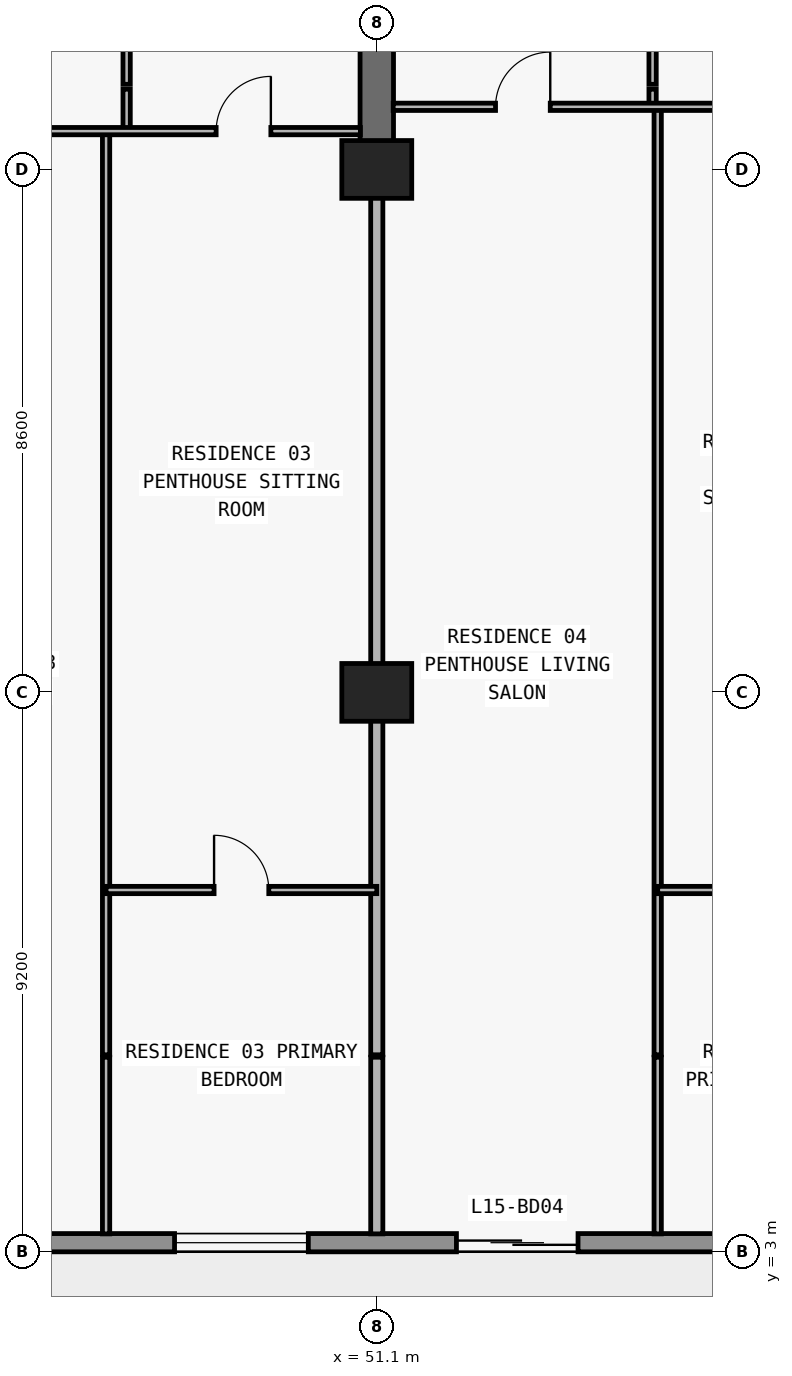
"""IFC4 building model, lengths in metres.
Left out: names, types, materials, properties, quantities, classifications, styles, units other than length and angle.
Written with IfcOpenShell. Run it as: python <this file> out.ifc"""

import sys

from ifc_helpers import new_model, si_unit, direction, frame, frame_2d, origin, origin_2d, place, context, subcontext, project, spatial, rectangle, extrude, element, fill, save


model = new_model("IFC4")
c1 = context("Model", 3, precision=1e-05, world=origin(), true_north=direction((0.0, 1.0)))
c2 = subcontext(c1, "Body", "Model", "MODEL_VIEW")
j1 = project(units=[si_unit("LENGTHUNIT", "METRE"), si_unit("PLANEANGLEUNIT", "RADIAN")], contexts=[c1])
p1 = place(None, origin())
s1 = spatial("IfcSite", under=j1, at=p1, CompositionType="ELEMENT")
p2 = place(p1, origin())
s2 = spatial("IfcBuilding", under=s1, at=p2, CompositionType="ELEMENT")
p3 = place(p2, frame((0.0, 0.0, 59.7)))
s3 = spatial("IfcBuildingStorey", under=s2, at=p3, CompositionType="ELEMENT", Elevation=59.7)
for number, where, z_axis, x_axis in (
    (1, (51.1, 12.2, 0.0), (0.0, 0.0, 1.0), (1.0, 0.0, 0.0)),
    (2, (51.1, 20.8, 0.0), (0.0, 0.0, 1.0), (1.0, 0.0, 0.0)),
):
    element("IfcColumn", number, at=place(p3, frame(where, z_axis=z_axis, x_axis=x_axis)), inside=s3, PredefinedType="COLUMN", context=c2, shape_type="SweptSolid", body=[
        extrude(rectangle(XDim=1.15, YDim=0.95, at=origin_2d()), origin(), (0.0, 0.0, 1.0), 3.05),
    ])
p4 = place(p3, frame((51.1, 20.8, 0.0), z_axis=(0.0, 0.0, 1.0), x_axis=(0.0, 1.0, 0.0)))
e3 = element("IfcWall", 3, at=p4, inside=s3, PredefinedType="SHEAR", context=c2, shape_type="SweptSolid", body=[
    extrude(rectangle(XDim=8.6, YDim=0.55, at=frame_2d((4.3, 0.0))), origin(), (0.0, 0.0, 1.0), 3.05),
])
p5 = place(p3, frame((72.7, 3.15, 0.0), z_axis=(0.0, 0.0, 1.0), x_axis=(-1.0, 0.0, 0.0)))
e4 = element("IfcWall", 4, at=p5, inside=s3, PredefinedType="STANDARD", context=c2, shape_type="SweptSolid", body=[
    extrude(rectangle(XDim=67.6, YDim=0.3, at=frame_2d((33.8, 0.0))), origin(), (0.0, 0.0, 1.0), 3.05),
])
p6 = place(p5, frame((59.89, 0.0, 0.0)))
e5 = element("IfcOpeningElement", 5, at=p6, cuts=e4, PredefinedType="OPENING", context=c2, shape_type="SweptSolid", body=[
    extrude(rectangle(XDim=2.0, YDim=2.3, at=frame_2d((1.0, 1.15))), frame((0.0, 0.16, 0.0), z_axis=(0.0, -1.0, 0.0), x_axis=(1.0, 0.0, 0.0)), (0.0, 0.0, 1.0), 0.32),
])
p7 = place(p5, frame((55.21, 0.0, 0.65)))
e6 = element("IfcOpeningElement", 6, at=p7, cuts=e4, PredefinedType="OPENING", context=c2, shape_type="SweptSolid", body=[
    extrude(rectangle(XDim=2.6, YDim=1.85, at=frame_2d((1.3, 0.925))), frame((0.0, 0.16, 0.0), z_axis=(0.0, -1.0, 0.0), x_axis=(1.0, 0.0, 0.0)), (0.0, 0.0, 1.0), 0.32),
])
p8 = place(p5, frame((49.1, 0.0, 0.85)))
e7 = element("IfcOpeningElement", 7, at=p8, cuts=e4, PredefinedType="OPENING", context=c2, shape_type="SweptSolid", body=[
    extrude(rectangle(XDim=2.2, YDim=1.55, at=frame_2d((1.1, 0.775))), frame((0.0, 0.16, 0.0), z_axis=(0.0, -1.0, 0.0), x_axis=(1.0, 0.0, 0.0)), (0.0, 0.0, 1.0), 0.32),
])
p9 = place(p5, frame((43.09, 0.0, 0.0)))
e8 = element("IfcOpeningElement", 8, at=p9, cuts=e4, PredefinedType="OPENING", context=c2, shape_type="SweptSolid", body=[
    extrude(rectangle(XDim=2.0, YDim=2.3, at=frame_2d((1.0, 1.15))), frame((0.0, 0.16, 0.0), z_axis=(0.0, -1.0, 0.0), x_axis=(1.0, 0.0, 0.0)), (0.0, 0.0, 1.0), 0.32),
])
p10 = place(p5, frame((38.41, 0.0, 0.65)))
e9 = element("IfcOpeningElement", 9, at=p10, cuts=e4, PredefinedType="OPENING", context=c2, shape_type="SweptSolid", body=[
    extrude(rectangle(XDim=2.6, YDim=1.85, at=frame_2d((1.3, 0.925))), frame((0.0, 0.16, 0.0), z_axis=(0.0, -1.0, 0.0), x_axis=(1.0, 0.0, 0.0)), (0.0, 0.0, 1.0), 0.32),
])
p11 = place(p5, frame((32.7, 0.0, 0.85)))
e10 = element("IfcOpeningElement", 10, at=p11, cuts=e4, PredefinedType="OPENING", context=c2, shape_type="SweptSolid", body=[
    extrude(rectangle(XDim=2.2, YDim=1.55, at=frame_2d((1.1, 0.775))), frame((0.0, 0.16, 0.0), z_axis=(0.0, -1.0, 0.0), x_axis=(1.0, 0.0, 0.0)), (0.0, 0.0, 1.0), 0.32),
])
p12 = place(p5, frame((27.026, 0.0, 0.0)))
e11 = element("IfcOpeningElement", 11, at=p12, cuts=e4, PredefinedType="OPENING", context=c2, shape_type="SweptSolid", body=[
    extrude(rectangle(XDim=2.0, YDim=2.3, at=frame_2d((1.0, 1.15))), frame((0.0, 0.16, 0.0), z_axis=(0.0, -1.0, 0.0), x_axis=(1.0, 0.0, 0.0)), (0.0, 0.0, 1.0), 0.32),
])
p13 = place(p5, frame((22.726, 0.0, 0.85)))
e12 = element("IfcOpeningElement", 12, at=p13, cuts=e4, PredefinedType="OPENING", context=c2, shape_type="SweptSolid", body=[
    extrude(rectangle(XDim=2.2, YDim=1.55, at=frame_2d((1.1, 0.775))), frame((0.0, 0.16, 0.0), z_axis=(0.0, -1.0, 0.0), x_axis=(1.0, 0.0, 0.0)), (0.0, 0.0, 1.0), 0.32),
])
p14 = place(p5, frame((18.29, 0.0, 0.0)))
e13 = element("IfcOpeningElement", 13, at=p14, cuts=e4, PredefinedType="OPENING", context=c2, shape_type="SweptSolid", body=[
    extrude(rectangle(XDim=2.0, YDim=2.3, at=frame_2d((1.0, 1.15))), frame((0.0, 0.16, 0.0), z_axis=(0.0, -1.0, 0.0), x_axis=(1.0, 0.0, 0.0)), (0.0, 0.0, 1.0), 0.32),
])
p15 = place(p5, frame((14.19, 0.0, 0.85)))
e14 = element("IfcOpeningElement", 14, at=p15, cuts=e4, PredefinedType="OPENING", context=c2, shape_type="SweptSolid", body=[
    extrude(rectangle(XDim=1.8, YDim=1.55, at=frame_2d((0.9, 0.775))), frame((0.0, 0.16, 0.0), z_axis=(0.0, -1.0, 0.0), x_axis=(1.0, 0.0, 0.0)), (0.0, 0.0, 1.0), 0.32),
])
p16 = place(p5, frame((10.226, 0.0, 0.0)))
e15 = element("IfcOpeningElement", 15, at=p16, cuts=e4, PredefinedType="OPENING", context=c2, shape_type="SweptSolid", body=[
    extrude(rectangle(XDim=2.0, YDim=2.3, at=frame_2d((1.0, 1.15))), frame((0.0, 0.16, 0.0), z_axis=(0.0, -1.0, 0.0), x_axis=(1.0, 0.0, 0.0)), (0.0, 0.0, 1.0), 0.32),
])
p17 = place(p5, frame((5.926, 0.0, 0.85)))
e16 = element("IfcOpeningElement", 16, at=p17, cuts=e4, PredefinedType="OPENING", context=c2, shape_type="SweptSolid", body=[
    extrude(rectangle(XDim=2.2, YDim=1.55, at=frame_2d((1.1, 0.775))), frame((0.0, 0.16, 0.0), z_axis=(0.0, -1.0, 0.0), x_axis=(1.0, 0.0, 0.0)), (0.0, 0.0, 1.0), 0.32),
])
p18 = place(p3, frame((46.648, 3.295, 0.0), z_axis=(0.0, 0.0, 1.0), x_axis=(0.0, 1.0, 0.0)))
e17 = element("IfcWall", 17, at=p18, inside=s3, PredefinedType="PARTITIONING", context=c2, shape_type="SweptSolid", body=[
    extrude(rectangle(XDim=2.905, YDim=0.12, at=frame_2d((1.453, 0.0))), origin(), (0.0, 0.0, 1.0), 3.05),
])
p19 = place(p3, frame((46.648, 6.24, 0.0), z_axis=(0.0, 0.0, 1.0), x_axis=(0.0, 1.0, 0.0)))
e18 = element("IfcWall", 18, at=p19, inside=s3, PredefinedType="PARTITIONING", context=c2, shape_type="SweptSolid", body=[
    extrude(rectangle(XDim=15.19, YDim=0.12, at=frame_2d((7.595, 0.0))), origin(), (0.0, 0.0, 1.0), 3.05),
])
p20 = place(p3, frame((46.986, 21.43, 0.0), z_axis=(0.0, 0.0, 1.0), x_axis=(0.0, 1.0, 0.0)))
e19 = element("IfcWall", 19, at=p20, inside=s3, PredefinedType="PARTITIONING", context=c2, shape_type="SweptSolid", body=[
    extrude(rectangle(XDim=0.69, YDim=0.12, at=frame_2d((0.345, 0.0))), origin(), (0.0, 0.0, 1.0), 3.05),
])
p21 = place(p3, frame((46.986, 22.2, 0.0), z_axis=(0.0, 0.0, 1.0), x_axis=(0.0, 1.0, 0.0)))
e20 = element("IfcWall", 20, at=p21, inside=s3, PredefinedType="PARTITIONING", context=c2, shape_type="SweptSolid", body=[
    extrude(rectangle(XDim=4.38, YDim=0.12, at=frame_2d((2.19, 0.0))), origin(), (0.0, 0.0, 1.0), 3.05),
])
p22 = place(p21, frame((1.74, 0.0, 0.0)))
e21 = element("IfcOpeningElement", 21, at=p22, cuts=e20, PredefinedType="OPENING", context=c2, shape_type="SweptSolid", body=[
    extrude(rectangle(XDim=0.9, YDim=2.15, at=frame_2d((0.45, 1.075))), frame((0.0, 0.07, 0.0), z_axis=(0.0, -1.0, 0.0), x_axis=(1.0, 0.0, 0.0)), (0.0, 0.0, 1.0), 0.14),
])
p23 = place(p3, frame((51.1, 3.295, 0.0), z_axis=(0.0, 0.0, 1.0), x_axis=(0.0, 1.0, 0.0)))
e22 = element("IfcWall", 22, at=p23, inside=s3, PredefinedType="PARTITIONING", context=c2, shape_type="SweptSolid", body=[
    extrude(rectangle(XDim=2.905, YDim=0.2, at=frame_2d((1.453, 0.0))), origin(), (0.0, 0.0, 1.0), 3.05),
])
p24 = place(p3, frame((51.1, 6.24, 0.0), z_axis=(0.0, 0.0, 1.0), x_axis=(0.0, 1.0, 0.0)))
e23 = element("IfcWall", 23, at=p24, inside=s3, PredefinedType="PARTITIONING", context=c2, shape_type="SweptSolid", body=[
    extrude(rectangle(XDim=14.555, YDim=0.2, at=frame_2d((7.277, 0.0))), origin(), (0.0, 0.0, 1.0), 2.11),
])
p25 = place(p3, frame((55.636, 21.83, 0.0), z_axis=(0.0, 0.0, 1.0), x_axis=(0.0, 1.0, 0.0)))
e24 = element("IfcWall", 24, at=p25, inside=s3, PredefinedType="PARTITIONING", context=c2, shape_type="SweptSolid", body=[
    extrude(rectangle(XDim=0.29, YDim=0.12, at=frame_2d((0.145, 0.0))), origin(), (0.0, 0.0, 1.0), 3.05),
])
p26 = place(p3, frame((55.636, 22.2, 0.0), z_axis=(0.0, 0.0, 1.0), x_axis=(0.0, 1.0, 0.0)))
e25 = element("IfcWall", 25, at=p26, inside=s3, PredefinedType="PARTITIONING", context=c2, shape_type="SweptSolid", body=[
    extrude(rectangle(XDim=4.38, YDim=0.12, at=frame_2d((2.19, 0.0))), origin(), (0.0, 0.0, 1.0), 3.05),
])
p27 = place(p26, frame((1.74, 0.0, 0.0)))
e26 = element("IfcOpeningElement", 26, at=p27, cuts=e25, PredefinedType="OPENING", context=c2, shape_type="SweptSolid", body=[
    extrude(rectangle(XDim=0.9, YDim=2.15, at=frame_2d((0.45, 1.075))), frame((0.0, 0.07, 0.0), z_axis=(0.0, -1.0, 0.0), x_axis=(1.0, 0.0, 0.0)), (0.0, 0.0, 1.0), 0.14),
])
p28 = place(p3, frame((55.72, 3.295, 0.0), z_axis=(0.0, 0.0, 1.0), x_axis=(0.0, 1.0, 0.0)))
e27 = element("IfcWall", 27, at=p28, inside=s3, PredefinedType="PARTITIONING", context=c2, shape_type="SweptSolid", body=[
    extrude(rectangle(XDim=2.905, YDim=0.12, at=frame_2d((1.453, 0.0))), origin(), (0.0, 0.0, 1.0), 3.05),
])
p29 = place(p3, frame((55.72, 6.24, 0.0), z_axis=(0.0, 0.0, 1.0), x_axis=(0.0, 1.0, 0.0)))
e28 = element("IfcWall", 28, at=p29, inside=s3, PredefinedType="PARTITIONING", context=c2, shape_type="SweptSolid", body=[
    extrude(rectangle(XDim=15.585, YDim=0.12, at=frame_2d((7.792, 0.0))), origin(), (0.0, 0.0, 1.0), 3.05),
])
p30 = place(p3, frame((46.648, 8.95, 0.0), z_axis=(0.0, 0.0, 1.0), x_axis=(1.0, 0.0, 0.0)))
e29 = element("IfcWall", 29, at=p30, inside=s3, PredefinedType="PARTITIONING", context=c2, shape_type="SweptSolid", body=[
    extrude(rectangle(XDim=4.452, YDim=0.12, at=frame_2d((2.226, 0.0))), origin(), (0.0, 0.0, 1.0), 3.05),
])
p31 = place(p30, frame((1.776, 0.0, 0.0)))
e30 = element("IfcOpeningElement", 30, at=p31, cuts=e29, PredefinedType="OPENING", context=c2, shape_type="SweptSolid", body=[
    extrude(rectangle(XDim=0.9, YDim=2.15, at=frame_2d((0.45, 1.075))), frame((0.0, 0.07, 0.0), z_axis=(0.0, -1.0, 0.0), x_axis=(1.0, 0.0, 0.0)), (0.0, 0.0, 1.0), 0.14),
])
p32 = place(p3, frame((55.72, 8.95, 0.0), z_axis=(0.0, 0.0, 1.0), x_axis=(1.0, 0.0, 0.0)))
e31 = element("IfcWall", 31, at=p32, inside=s3, PredefinedType="PARTITIONING", context=c2, shape_type="SweptSolid", body=[
    extrude(rectangle(XDim=3.78, YDim=0.12, at=frame_2d((1.89, 0.0))), origin(), (0.0, 0.0, 1.0), 3.05),
])
p33 = place(p32, frame((1.44, 0.0, 0.0)))
e32 = element("IfcOpeningElement", 32, at=p33, cuts=e31, PredefinedType="OPENING", context=c2, shape_type="SweptSolid", body=[
    extrude(rectangle(XDim=0.9, YDim=2.15, at=frame_2d((0.45, 1.075))), frame((0.0, 0.07, 0.0), z_axis=(0.0, -1.0, 0.0), x_axis=(1.0, 0.0, 0.0)), (0.0, 0.0, 1.0), 0.14),
])
p34 = place(p3, frame((42.7, 21.43, 0.0), z_axis=(0.0, 0.0, 1.0), x_axis=(1.0, 0.0, 0.0)))
e33 = element("IfcWall", 33, at=p34, inside=s3, PredefinedType="PARTITIONING", context=c2, shape_type="SweptSolid", body=[
    extrude(rectangle(XDim=8.13, YDim=0.12, at=frame_2d((4.065, 0.0))), origin(), (0.0, 0.0, 1.0), 3.05),
])
p35 = place(p34, frame((1.524, 0.0, 0.0)))
e34 = element("IfcOpeningElement", 34, at=p35, cuts=e33, PredefinedType="OPENING", context=c2, shape_type="SweptSolid", body=[
    extrude(rectangle(XDim=0.9, YDim=2.15, at=frame_2d((0.45, 1.075))), frame((0.0, 0.07, 0.0), z_axis=(0.0, -1.0, 0.0), x_axis=(1.0, 0.0, 0.0)), (0.0, 0.0, 1.0), 0.14),
])
p36 = place(p34, frame((5.758, 0.0, 0.0)))
e35 = element("IfcOpeningElement", 35, at=p36, cuts=e33, PredefinedType="OPENING", context=c2, shape_type="SweptSolid", body=[
    extrude(rectangle(XDim=0.9, YDim=2.15, at=frame_2d((0.45, 1.075))), frame((0.0, 0.07, 0.0), z_axis=(0.0, -1.0, 0.0), x_axis=(1.0, 0.0, 0.0)), (0.0, 0.0, 1.0), 0.14),
])
p37 = place(p3, frame((51.37, 21.83, 0.0), z_axis=(0.0, 0.0, 1.0), x_axis=(1.0, 0.0, 0.0)))
e36 = element("IfcWall", 36, at=p37, inside=s3, PredefinedType="PARTITIONING", context=c2, shape_type="SweptSolid", body=[
    extrude(rectangle(XDim=8.13, YDim=0.12, at=frame_2d((4.065, 0.0))), origin(), (0.0, 0.0, 1.0), 3.05),
])
p38 = place(p37, frame((1.683, 0.0, 0.0)))
e37 = element("IfcOpeningElement", 37, at=p38, cuts=e36, PredefinedType="OPENING", context=c2, shape_type="SweptSolid", body=[
    extrude(rectangle(XDim=0.9, YDim=2.15, at=frame_2d((0.45, 1.075))), frame((0.0, 0.07, 0.0), z_axis=(0.0, -1.0, 0.0), x_axis=(1.0, 0.0, 0.0)), (0.0, 0.0, 1.0), 0.14),
])
p39 = place(p37, frame((5.79, 0.0, 0.0)))
e38 = element("IfcOpeningElement", 38, at=p39, cuts=e36, PredefinedType="OPENING", context=c2, shape_type="SweptSolid", body=[
    extrude(rectangle(XDim=0.9, YDim=2.15, at=frame_2d((0.45, 1.075))), frame((0.0, 0.07, 0.0), z_axis=(0.0, -1.0, 0.0), x_axis=(1.0, 0.0, 0.0)), (0.0, 0.0, 1.0), 0.14),
])
p40 = place(p13, origin())
e39 = element("IfcWindow", 39, at=p40, inside=s3, PartitioningType="SINGLE_PANEL", PredefinedType="WINDOW", context=c2, shape_type="SweptSolid", body=[
    extrude(rectangle(XDim=2.2, YDim=1.55, at=frame_2d((1.1, 0.775))), frame((0.0, 0.03, 0.0), z_axis=(0.0, -1.0, 0.0), x_axis=(1.0, 0.0, 0.0)), (0.0, 0.0, 1.0), 0.06),
])
fill(e12, e39)
p41 = place(p14, origin())
e40 = element("IfcDoor", 40, at=p41, inside=s3, OperationType="DOUBLE_DOOR_SLIDING", PredefinedType="DOOR", context=c2, shape_type="SweptSolid", body=[
    extrude(rectangle(XDim=2.0, YDim=2.3, at=frame_2d((1.0, 1.15))), frame((0.0, 0.025, 0.0), z_axis=(0.0, -1.0, 0.0), x_axis=(1.0, 0.0, 0.0)), (0.0, 0.0, 1.0), 0.05),
])
fill(e13, e40)
p42 = place(p36, origin())
e41 = element("IfcDoor", 41, at=p42, inside=s3, OperationType="SINGLE_SWING_RIGHT", PredefinedType="DOOR", context=c2, shape_type="SweptSolid", body=[
    extrude(rectangle(XDim=0.9, YDim=2.15, at=frame_2d((0.45, 1.075))), frame((0.0, 0.025, 0.0), z_axis=(0.0, -1.0, 0.0), x_axis=(1.0, 0.0, 0.0)), (0.0, 0.0, 1.0), 0.05),
])
fill(e35, e41)
p43 = place(p31, origin())
e42 = element("IfcDoor", 42, at=p43, inside=s3, OperationType="SINGLE_SWING_LEFT", PredefinedType="DOOR", context=c2, shape_type="SweptSolid", body=[
    extrude(rectangle(XDim=0.9, YDim=2.15, at=frame_2d((0.45, 1.075))), frame((0.0, 0.025, 0.0), z_axis=(0.0, -1.0, 0.0), x_axis=(1.0, 0.0, 0.0)), (0.0, 0.0, 1.0), 0.05),
])
fill(e30, e42)
p44 = place(p38, origin())
e43 = element("IfcDoor", 43, at=p44, inside=s3, OperationType="SINGLE_SWING_RIGHT", PredefinedType="DOOR", context=c2, shape_type="SweptSolid", body=[
    extrude(rectangle(XDim=0.9, YDim=2.15, at=frame_2d((0.45, 1.075))), frame((0.0, 0.025, 0.0), z_axis=(0.0, -1.0, 0.0), x_axis=(1.0, 0.0, 0.0)), (0.0, 0.0, 1.0), 0.05),
])
fill(e37, e43)
save(model, sys.argv[1])
